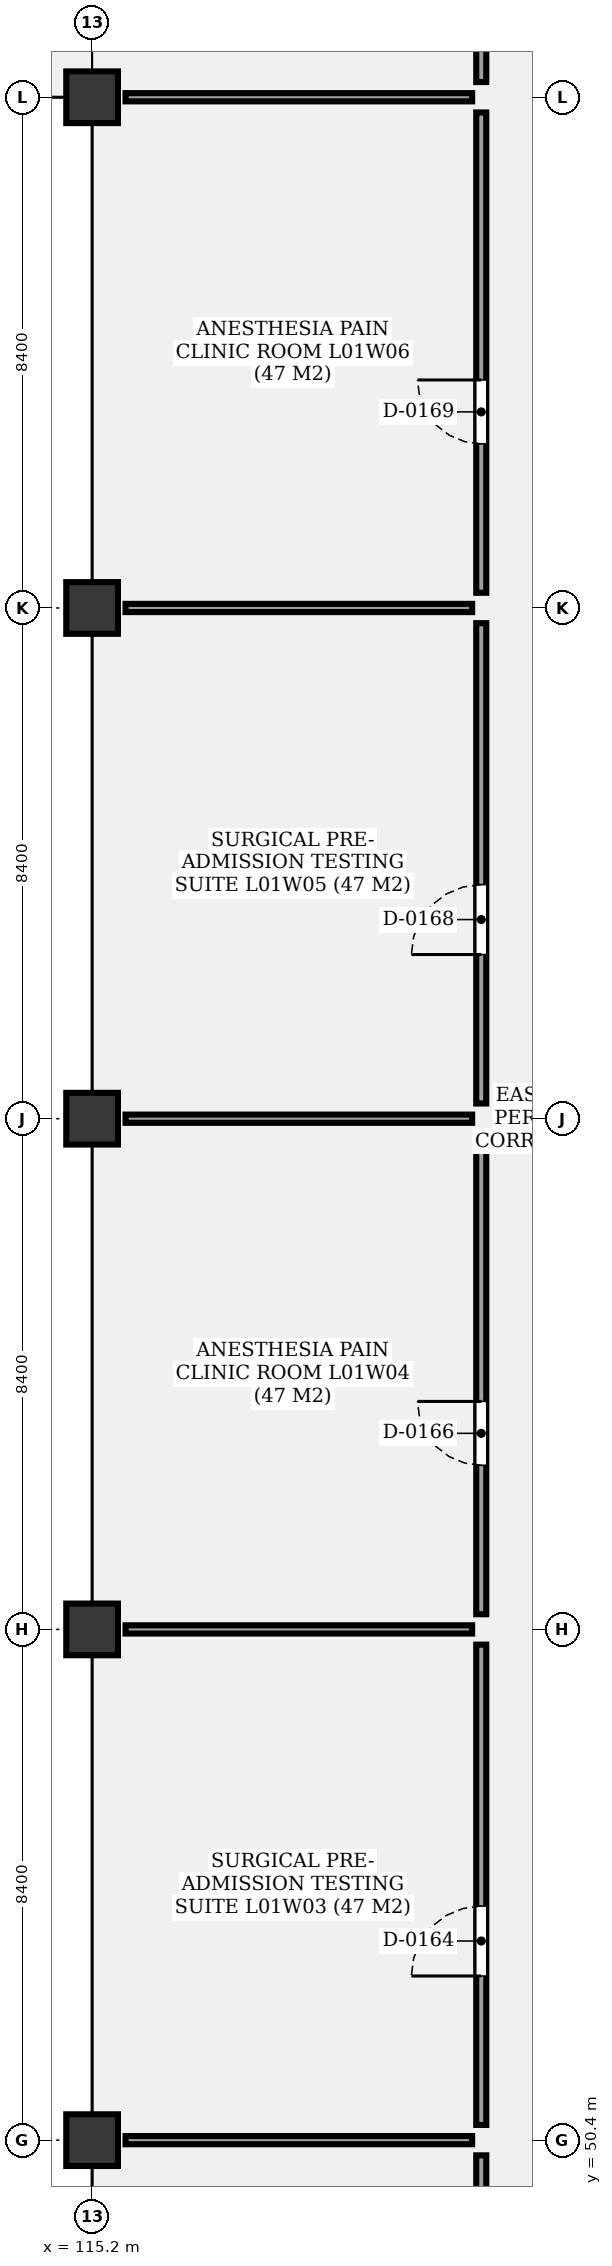
"""IFC4 building model, lengths in metres.
Left out: names, types, materials, properties, quantities, classifications, styles, units other than length and angle.
Written with IfcOpenShell. Run it as: python <this file> out.ifc"""

import sys

from ifc_helpers import new_model, si_unit, direction, frame, frame_2d, origin, origin_2d, place, context, subcontext, project, spatial, rectangle, extrude, element, fill, save


model = new_model("IFC4")
c1 = context("Model", 3, precision=1e-05, world=origin(), true_north=direction((0.0, 1.0)))
c2 = subcontext(c1, "Body", "Model", "MODEL_VIEW")
j1 = project(units=[si_unit("LENGTHUNIT", "METRE"), si_unit("PLANEANGLEUNIT", "RADIAN")], contexts=[c1])
p1 = place(None, origin())
s1 = spatial("IfcSite", under=j1, at=p1, CompositionType="ELEMENT")
p2 = place(p1, origin())
s2 = spatial("IfcBuilding", under=s1, at=p2, CompositionType="ELEMENT")
p3 = place(p2, frame((0.0, 0.0, 5.1)))
s3 = spatial("IfcBuildingStorey", under=s2, at=p3, CompositionType="ELEMENT", Elevation=5.1)
for number, where, z_axis, x_axis in (
    (1, (115.2, 50.4, 0.0), (0.0, 0.0, 1.0), (1.0, 0.0, 0.0)),
    (2, (115.2, 58.8, 0.0), (0.0, 0.0, 1.0), (1.0, 0.0, 0.0)),
    (3, (115.2, 67.2, 0.0), (0.0, 0.0, 1.0), (1.0, 0.0, 0.0)),
    (4, (115.2, 75.6, 0.0), (0.0, 0.0, 1.0), (1.0, 0.0, 0.0)),
    (5, (115.2, 84.0, 0.0), (0.0, 0.0, 1.0), (1.0, 0.0, 0.0)),
):
    element("IfcColumn", number, at=place(p3, frame(where, z_axis=z_axis, x_axis=x_axis)), inside=s3, PredefinedType="COLUMN", context=c2, shape_type="SweptSolid", body=[
        extrude(rectangle(XDim=0.85, YDim=0.85, at=origin_2d()), origin(), (0.0, 0.0, 1.0), 4.8),
    ])
p4 = place(p3, frame((121.6, 42.25, 0.0), z_axis=(0.0, 0.0, 1.0), x_axis=(0.0, 1.0, 0.0)))
e6 = element("IfcWall", 6, at=p4, inside=s3, PredefinedType="PARTITIONING", context=c2, shape_type="SweptSolid", body=[
    extrude(rectangle(XDim=7.9, YDim=0.165, at=frame_2d((3.95, 0.0))), origin(), (0.0, 0.0, 1.0), 3.68),
])
p5 = place(p4, frame((2.45, 0.0, 0.0)))
e7 = element("IfcOpeningElement", 7, at=p5, cuts=e6, PredefinedType="OPENING", context=c2, shape_type="SweptSolid", body=[
    extrude(rectangle(XDim=1.05, YDim=2.1, at=frame_2d((0.525, 1.05))), frame((0.0, 0.093, 0.0), z_axis=(0.0, -1.0, 0.0), x_axis=(1.0, 0.0, 0.0)), (0.0, 0.0, 1.0), 0.185),
])
p6 = place(p3, frame((121.6, 50.65, 0.0), z_axis=(0.0, 0.0, 1.0), x_axis=(0.0, 1.0, 0.0)))
e8 = element("IfcWall", 8, at=p6, inside=s3, PredefinedType="PARTITIONING", context=c2, shape_type="SweptSolid", body=[
    extrude(rectangle(XDim=7.9, YDim=0.165, at=frame_2d((3.95, 0.0))), origin(), (0.0, 0.0, 1.0), 3.68),
])
p7 = place(p6, frame((2.45, 0.0, 0.0)))
e9 = element("IfcOpeningElement", 9, at=p7, cuts=e8, PredefinedType="OPENING", context=c2, shape_type="SweptSolid", body=[
    extrude(rectangle(XDim=1.15, YDim=2.2, at=frame_2d((0.575, 1.1))), frame((0.0, 0.093, 0.0), z_axis=(0.0, -1.0, 0.0), x_axis=(1.0, 0.0, 0.0)), (0.0, 0.0, 1.0), 0.185),
])
p8 = place(p3, frame((115.75, 50.4, 0.0), z_axis=(0.0, 0.0, 1.0), x_axis=(1.0, 0.0, 0.0)))
e10 = element("IfcWall", 10, at=p8, inside=s3, PredefinedType="PARTITIONING", context=c2, shape_type="SweptSolid", body=[
    extrude(rectangle(XDim=5.7, YDim=0.135, at=frame_2d((2.85, 0.0))), origin(), (0.0, 0.0, 1.0), 3.68),
])
p9 = place(p3, frame((121.6, 59.05, 0.0), z_axis=(0.0, 0.0, 1.0), x_axis=(0.0, 1.0, 0.0)))
e11 = element("IfcWall", 11, at=p9, inside=s3, PredefinedType="PARTITIONING", context=c2, shape_type="SweptSolid", body=[
    extrude(rectangle(XDim=7.9, YDim=0.165, at=frame_2d((3.95, 0.0))), origin(), (0.0, 0.0, 1.0), 3.68),
])
p10 = place(p9, frame((2.45, 0.0, 0.0)))
e12 = element("IfcOpeningElement", 12, at=p10, cuts=e11, PredefinedType="OPENING", context=c2, shape_type="SweptSolid", body=[
    extrude(rectangle(XDim=1.05, YDim=2.1, at=frame_2d((0.525, 1.05))), frame((0.0, 0.093, 0.0), z_axis=(0.0, -1.0, 0.0), x_axis=(1.0, 0.0, 0.0)), (0.0, 0.0, 1.0), 0.185),
])
p11 = place(p3, frame((115.75, 58.8, 0.0), z_axis=(0.0, 0.0, 1.0), x_axis=(1.0, 0.0, 0.0)))
e13 = element("IfcWall", 13, at=p11, inside=s3, PredefinedType="PARTITIONING", context=c2, shape_type="SweptSolid", body=[
    extrude(rectangle(XDim=5.7, YDim=0.135, at=frame_2d((2.85, 0.0))), origin(), (0.0, 0.0, 1.0), 3.68),
])
p12 = place(p3, frame((121.6, 67.45, 0.0), z_axis=(0.0, 0.0, 1.0), x_axis=(0.0, 1.0, 0.0)))
e14 = element("IfcWall", 14, at=p12, inside=s3, PredefinedType="PARTITIONING", context=c2, shape_type="SweptSolid", body=[
    extrude(rectangle(XDim=7.9, YDim=0.165, at=frame_2d((3.95, 0.0))), origin(), (0.0, 0.0, 1.0), 3.68),
])
p13 = place(p12, frame((2.45, 0.0, 0.0)))
e15 = element("IfcOpeningElement", 15, at=p13, cuts=e14, PredefinedType="OPENING", context=c2, shape_type="SweptSolid", body=[
    extrude(rectangle(XDim=1.15, YDim=2.2, at=frame_2d((0.575, 1.1))), frame((0.0, 0.093, 0.0), z_axis=(0.0, -1.0, 0.0), x_axis=(1.0, 0.0, 0.0)), (0.0, 0.0, 1.0), 0.185),
])
p14 = place(p3, frame((115.75, 67.2, 0.0), z_axis=(0.0, 0.0, 1.0), x_axis=(1.0, 0.0, 0.0)))
e16 = element("IfcWall", 16, at=p14, inside=s3, PredefinedType="PARTITIONING", context=c2, shape_type="SweptSolid", body=[
    extrude(rectangle(XDim=5.7, YDim=0.135, at=frame_2d((2.85, 0.0))), origin(), (0.0, 0.0, 1.0), 3.68),
])
p15 = place(p3, frame((121.6, 75.85, 0.0), z_axis=(0.0, 0.0, 1.0), x_axis=(0.0, 1.0, 0.0)))
e17 = element("IfcWall", 17, at=p15, inside=s3, PredefinedType="PARTITIONING", context=c2, shape_type="SweptSolid", body=[
    extrude(rectangle(XDim=7.9, YDim=0.165, at=frame_2d((3.95, 0.0))), origin(), (0.0, 0.0, 1.0), 3.68),
])
p16 = place(p15, frame((2.45, 0.0, 0.0)))
e18 = element("IfcOpeningElement", 18, at=p16, cuts=e17, PredefinedType="OPENING", context=c2, shape_type="SweptSolid", body=[
    extrude(rectangle(XDim=1.05, YDim=2.1, at=frame_2d((0.525, 1.05))), frame((0.0, 0.093, 0.0), z_axis=(0.0, -1.0, 0.0), x_axis=(1.0, 0.0, 0.0)), (0.0, 0.0, 1.0), 0.185),
])
p17 = place(p3, frame((115.75, 75.6, 0.0), z_axis=(0.0, 0.0, 1.0), x_axis=(1.0, 0.0, 0.0)))
e19 = element("IfcWall", 19, at=p17, inside=s3, PredefinedType="PARTITIONING", context=c2, shape_type="SweptSolid", body=[
    extrude(rectangle(XDim=5.7, YDim=0.135, at=frame_2d((2.85, 0.0))), origin(), (0.0, 0.0, 1.0), 3.68),
])
p18 = place(p3, frame((121.6, 84.25, 0.0), z_axis=(0.0, 0.0, 1.0), x_axis=(0.0, 1.0, 0.0)))
e20 = element("IfcWall", 20, at=p18, inside=s3, PredefinedType="PARTITIONING", context=c2, shape_type="SweptSolid", body=[
    extrude(rectangle(XDim=7.9, YDim=0.165, at=frame_2d((3.95, 0.0))), origin(), (0.0, 0.0, 1.0), 3.68),
])
p19 = place(p18, frame((2.45, 0.0, 0.0)))
e21 = element("IfcOpeningElement", 21, at=p19, cuts=e20, PredefinedType="OPENING", context=c2, shape_type="SweptSolid", body=[
    extrude(rectangle(XDim=1.15, YDim=2.2, at=frame_2d((0.575, 1.1))), frame((0.0, 0.093, 0.0), z_axis=(0.0, -1.0, 0.0), x_axis=(1.0, 0.0, 0.0)), (0.0, 0.0, 1.0), 0.185),
])
p20 = place(p3, frame((115.75, 84.0, 0.0), z_axis=(0.0, 0.0, 1.0), x_axis=(1.0, 0.0, 0.0)))
e22 = element("IfcWall", 22, at=p20, inside=s3, PredefinedType="PARTITIONING", context=c2, shape_type="SweptSolid", body=[
    extrude(rectangle(XDim=5.7, YDim=0.135, at=frame_2d((2.85, 0.0))), origin(), (0.0, 0.0, 1.0), 3.68),
])
p21 = place(p7, origin())
e23 = element("IfcDoor", 23, at=p21, inside=s3, OperationType="SINGLE_SWING_LEFT", PredefinedType="DOOR", context=c2, shape_type="SweptSolid", body=[
    extrude(rectangle(XDim=1.15, YDim=2.2, at=frame_2d((0.575, 1.1))), frame((0.0, 0.025, 0.0), z_axis=(0.0, -1.0, 0.0), x_axis=(1.0, 0.0, 0.0)), (0.0, 0.0, 1.0), 0.05),
])
fill(e9, e23)
p22 = place(p10, origin())
e24 = element("IfcDoor", 24, at=p22, inside=s3, OperationType="SINGLE_SWING_RIGHT", PredefinedType="DOOR", context=c2, shape_type="SweptSolid", body=[
    extrude(rectangle(XDim=1.05, YDim=2.1, at=frame_2d((0.525, 1.05))), frame((0.0, 0.025, 0.0), z_axis=(0.0, -1.0, 0.0), x_axis=(1.0, 0.0, 0.0)), (0.0, 0.0, 1.0), 0.05),
])
fill(e12, e24)
p23 = place(p13, origin())
e25 = element("IfcDoor", 25, at=p23, inside=s3, OperationType="SINGLE_SWING_LEFT", PredefinedType="DOOR", context=c2, shape_type="SweptSolid", body=[
    extrude(rectangle(XDim=1.15, YDim=2.2, at=frame_2d((0.575, 1.1))), frame((0.0, 0.025, 0.0), z_axis=(0.0, -1.0, 0.0), x_axis=(1.0, 0.0, 0.0)), (0.0, 0.0, 1.0), 0.05),
])
fill(e15, e25)
p24 = place(p16, origin())
e26 = element("IfcDoor", 26, at=p24, inside=s3, OperationType="SINGLE_SWING_RIGHT", PredefinedType="DOOR", context=c2, shape_type="SweptSolid", body=[
    extrude(rectangle(XDim=1.05, YDim=2.1, at=frame_2d((0.525, 1.05))), frame((0.0, 0.025, 0.0), z_axis=(0.0, -1.0, 0.0), x_axis=(1.0, 0.0, 0.0)), (0.0, 0.0, 1.0), 0.05),
])
fill(e18, e26)
save(model, sys.argv[1])
